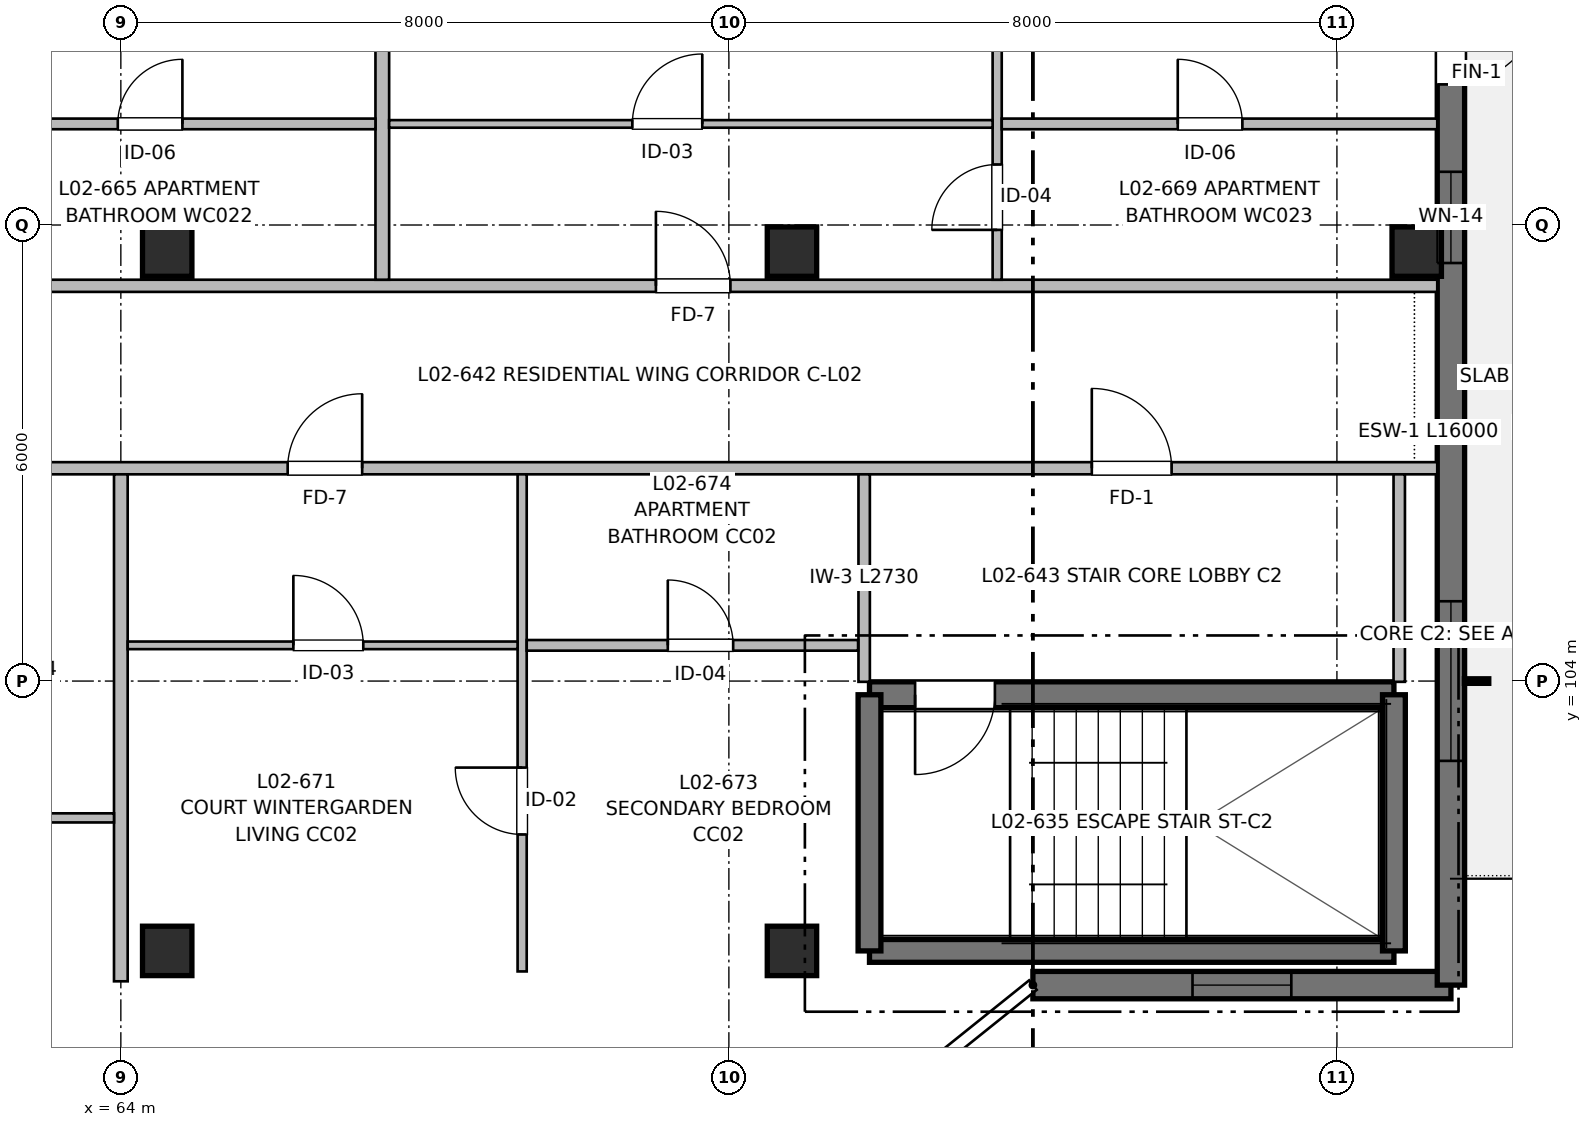
"""IFC4 building model, lengths in metres.
Left out: names, types, materials, properties, quantities, classifications, styles, units other than length and angle.
Written with IfcOpenShell. Run it as: python <this file> out.ifc"""

import sys

from ifc_helpers import new_model, si_unit, direction, frame, frame_2d, origin, origin_2d, place, context, subcontext, project, spatial, rectangle, extrude, element, fill, save


model = new_model("IFC4")
c1 = context("Model", 3, precision=1e-05, world=origin(), true_north=direction((0.0, 1.0)))
c2 = subcontext(c1, "Body", "Model", "MODEL_VIEW")
j1 = project(units=[si_unit("LENGTHUNIT", "METRE"), si_unit("PLANEANGLEUNIT", "RADIAN")], contexts=[c1])
p1 = place(None, origin())
s1 = spatial("IfcSite", under=j1, at=p1, CompositionType="ELEMENT")
p2 = place(p1, origin())
s2 = spatial("IfcBuilding", under=s1, at=p2, CompositionType="ELEMENT")
p3 = place(p2, frame((0.0, 0.0, 7.36)))
s3 = spatial("IfcBuildingStorey", under=s2, at=p3, CompositionType="ELEMENT", Elevation=7.36)
for number, where, z_axis, x_axis in (
    (1, (64.61, 100.45, 0.0), (0.0, 0.0, 1.0), (1.0, 0.0, 0.0)),
    (2, (64.61, 109.65, 0.0), (0.0, 0.0, 1.0), (1.0, 0.0, 0.0)),
    (3, (72.83, 100.45, 0.0), (0.0, 0.0, 1.0), (1.0, 0.0, 0.0)),
    (4, (72.83, 109.65, 0.0), (0.0, 0.0, 1.0), (1.0, 0.0, 0.0)),
    (5, (81.05, 109.65, 0.0), (0.0, 0.0, 1.0), (1.0, 0.0, 0.0)),
):
    element("IfcColumn", number, at=place(p3, frame(where, z_axis=z_axis, x_axis=x_axis)), inside=s3, PredefinedType="COLUMN", context=c2, shape_type="SweptSolid", body=[
        extrude(rectangle(XDim=0.65, YDim=0.65, at=origin_2d()), origin(), (0.0, 0.0, 1.0), 3.2),
    ])
p4 = place(p3, frame((73.85, 100.45, 0.0), z_axis=(0.0, 0.0, 1.0), x_axis=(1.0, 0.0, 0.0)))
e6 = element("IfcWall", 6, at=p4, inside=s3, PredefinedType="SHEAR", context=c2, shape_type="SweptSolid", body=[
    extrude(rectangle(XDim=6.9, YDim=0.3, at=frame_2d((3.45, 0.0))), origin(), (0.0, 0.0, 1.0), 3.2),
])
p5 = place(p3, frame((80.75, 103.82, 0.0), z_axis=(0.0, 0.0, 1.0), x_axis=(-1.0, 0.0, 0.0)))
e7 = element("IfcWall", 7, at=p5, inside=s3, PredefinedType="SHEAR", context=c2, shape_type="SweptSolid", body=[
    extrude(rectangle(XDim=6.9, YDim=0.34, at=frame_2d((3.45, 0.0))), origin(), (0.0, 0.0, 1.0), 3.2),
])
p6 = place(p5, frame((5.25, 0.0, 0.0)))
e8 = element("IfcOpeningElement", 8, at=p6, cuts=e7, PredefinedType="OPENING", context=c2, shape_type="SweptSolid", body=[
    extrude(rectangle(XDim=1.05, YDim=2.15, at=frame_2d((0.525, 1.075))), frame((0.0, 0.18, 0.0), z_axis=(0.0, -1.0, 0.0), x_axis=(1.0, 0.0, 0.0)), (0.0, 0.0, 1.0), 0.36),
])
for number, where, z_axis, x_axis in (
    (9, (73.85, 103.82, 0.0), (0.0, 0.0, 1.0), (0.0, -1.0, 0.0)),
    (10, (80.75, 100.45, 0.0), (0.0, 0.0, 1.0), (0.0, 1.0, 0.0)),
):
    element("IfcWall", number, at=place(p3, frame(where, z_axis=z_axis, x_axis=x_axis)), inside=s3, PredefinedType="SHEAR", context=c2, shape_type="SweptSolid", body=[
        extrude(rectangle(XDim=3.37, YDim=0.3, at=frame_2d((1.685, 0.0))), origin(), (0.0, 0.0, 1.0), 3.2),
    ])
p7 = place(p3, frame((81.5, 100.0, 0.0), z_axis=(0.0, 0.0, 1.0), x_axis=(-1.0, 0.0, 0.0)))
e11 = element("IfcWall", 11, at=p7, inside=s3, PredefinedType="SHEAR", context=c2, shape_type="SweptSolid", body=[
    extrude(rectangle(XDim=5.5, YDim=0.36, at=frame_2d((2.75, 0.0))), origin(), (0.0, 0.0, 1.0), 2.98),
])
p8 = place(p7, frame((2.1, 0.0, 0.82)))
e12 = element("IfcOpeningElement", 12, at=p8, cuts=e11, PredefinedType="OPENING", context=c2, shape_type="SweptSolid", body=[
    extrude(rectangle(XDim=1.3, YDim=1.4, at=frame_2d((0.65, 0.7))), frame((0.0, 0.19, 0.0), z_axis=(0.0, -1.0, 0.0), x_axis=(1.0, 0.0, 0.0)), (0.0, 0.0, 1.0), 0.38),
])
p9 = place(p3, frame((81.5, 116.0, 0.0), z_axis=(0.0, 0.0, 1.0), x_axis=(0.0, -1.0, 0.0)))
e13 = element("IfcWall", 13, at=p9, inside=s3, PredefinedType="SHEAR", context=c2, shape_type="SweptSolid", body=[
    extrude(rectangle(XDim=16.0, YDim=0.36, at=frame_2d((8.0, 0.0))), origin(), (0.0, 0.0, 1.0), 2.98),
])
p10 = place(p9, frame((2.95, 0.0, 0.0)))
e14 = element("IfcOpeningElement", 14, at=p10, cuts=e13, PredefinedType="OPENING", context=c2, shape_type="SweptSolid", body=[
    extrude(rectangle(XDim=1.2, YDim=2.2, at=frame_2d((0.6, 1.1))), frame((0.0, 0.19, 0.0), z_axis=(0.0, -1.0, 0.0), x_axis=(1.0, 0.0, 0.0)), (0.0, 0.0, 1.0), 0.38),
])
p11 = place(p9, frame((5.3, 0.0, 0.9)))
e15 = element("IfcOpeningElement", 15, at=p11, cuts=e13, PredefinedType="OPENING", context=c2, shape_type="SweptSolid", body=[
    extrude(rectangle(XDim=1.2, YDim=1.05, at=frame_2d((0.6, 0.525))), frame((0.0, 0.19, 0.0), z_axis=(0.0, -1.0, 0.0), x_axis=(1.0, 0.0, 0.0)), (0.0, 0.0, 1.0), 0.38),
])
p12 = place(p9, frame((10.95, 0.0, 0.67)))
e16 = element("IfcOpeningElement", 16, at=p12, cuts=e13, PredefinedType="OPENING", context=c2, shape_type="SweptSolid", body=[
    extrude(rectangle(XDim=2.1, YDim=1.55, at=frame_2d((1.05, 0.775))), frame((0.0, 0.19, 0.0), z_axis=(0.0, -1.0, 0.0), x_axis=(1.0, 0.0, 0.0)), (0.0, 0.0, 1.0), 0.38),
])
p13 = place(p3, frame((57.2, 106.8, 0.0), z_axis=(0.0, 0.0, 1.0), x_axis=(1.0, 0.0, 0.0)))
e17 = element("IfcWall", 17, at=p13, inside=s3, PredefinedType="PARTITIONING", context=c2, shape_type="SweptSolid", body=[
    extrude(rectangle(XDim=24.12, YDim=0.16, at=frame_2d((12.06, 0.0))), origin(), (0.0, 0.0, 1.0), 2.935),
])
p14 = place(p13, frame((19.575, 0.0, 0.0)))
e18 = element("IfcOpeningElement", 18, at=p14, cuts=e17, PredefinedType="OPENING", context=c2, shape_type="SweptSolid", body=[
    extrude(rectangle(XDim=1.05, YDim=2.15, at=frame_2d((0.525, 1.075))), frame((0.0, 0.09, 0.0), z_axis=(0.0, -1.0, 0.0), x_axis=(1.0, 0.0, 0.0)), (0.0, 0.0, 1.0), 0.18),
])
p15 = place(p13, frame((8.995, 0.0, 0.0)))
e19 = element("IfcOpeningElement", 19, at=p15, cuts=e17, PredefinedType="OPENING", context=c2, shape_type="SweptSolid", body=[
    extrude(rectangle(XDim=0.98, YDim=2.15, at=frame_2d((0.49, 1.075))), frame((0.0, 0.09, 0.0), z_axis=(0.0, -1.0, 0.0), x_axis=(1.0, 0.0, 0.0)), (0.0, 0.0, 1.0), 0.18),
])
p16 = place(p3, frame((39.68, 109.2, 0.0), z_axis=(0.0, 0.0, 1.0), x_axis=(1.0, 0.0, 0.0)))
e20 = element("IfcWall", 20, at=p16, inside=s3, PredefinedType="PARTITIONING", context=c2, shape_type="SweptSolid", body=[
    extrude(rectangle(XDim=41.64, YDim=0.16, at=frame_2d((20.82, 0.0))), origin(), (0.0, 0.0, 1.0), 2.935),
])
p17 = place(p16, frame((3.51, 0.0, 0.0)))
e21 = element("IfcOpeningElement", 21, at=p17, cuts=e20, PredefinedType="OPENING", context=c2, shape_type="SweptSolid", body=[
    extrude(rectangle(XDim=0.98, YDim=2.15, at=frame_2d((0.49, 1.075))), frame((0.0, 0.09, 0.0), z_axis=(0.0, -1.0, 0.0), x_axis=(1.0, 0.0, 0.0)), (0.0, 0.0, 1.0), 0.18),
])
p18 = place(p16, frame((17.455, 0.0, 0.0)))
e22 = element("IfcOpeningElement", 22, at=p18, cuts=e20, PredefinedType="OPENING", context=c2, shape_type="SweptSolid", body=[
    extrude(rectangle(XDim=0.98, YDim=2.15, at=frame_2d((0.49, 1.075))), frame((0.0, 0.09, 0.0), z_axis=(0.0, -1.0, 0.0), x_axis=(1.0, 0.0, 0.0)), (0.0, 0.0, 1.0), 0.18),
])
p19 = place(p16, frame((31.36, 0.0, 0.0)))
e23 = element("IfcOpeningElement", 23, at=p19, cuts=e20, PredefinedType="OPENING", context=c2, shape_type="SweptSolid", body=[
    extrude(rectangle(XDim=0.98, YDim=2.15, at=frame_2d((0.49, 1.075))), frame((0.0, 0.09, 0.0), z_axis=(0.0, -1.0, 0.0), x_axis=(1.0, 0.0, 0.0)), (0.0, 0.0, 1.0), 0.18),
])
p20 = place(p3, frame((64.0, 100.05, 0.0), z_axis=(0.0, 0.0, 1.0), x_axis=(0.0, 1.0, 0.0)))
e24 = element("IfcWall", 24, at=p20, inside=s3, PredefinedType="PARTITIONING", context=c2, shape_type="SweptSolid", body=[
    extrude(rectangle(XDim=6.67, YDim=0.18, at=frame_2d((3.335, 0.0))), origin(), (0.0, 0.0, 1.0), 2.935),
])
for number, where, z_axis, x_axis in (
    (25, (73.78, 103.99, 0.0), (0.0, 0.0, 1.0), (0.0, 1.0, 0.0)),
    (26, (80.82, 103.99, 0.0), (0.0, 0.0, 1.0), (0.0, 1.0, 0.0)),
):
    element("IfcWall", number, at=place(p3, frame(where, z_axis=z_axis, x_axis=x_axis)), inside=s3, PredefinedType="PARTITIONING", context=c2, shape_type="SweptSolid", body=[
        extrude(rectangle(XDim=2.73, YDim=0.15, at=frame_2d((1.365, 0.0))), origin(), (0.0, 0.0, 1.0), 2.935),
    ])
p21 = place(p3, frame((59.72, 102.2, 0.0), z_axis=(0.0, 0.0, 1.0), x_axis=(1.0, 0.0, 0.0)))
e27 = element("IfcWall", 27, at=p21, inside=s3, PredefinedType="PARTITIONING", context=c2, shape_type="SweptSolid", body=[
    extrude(rectangle(XDim=4.19, YDim=0.12, at=frame_2d((2.095, 0.0))), origin(), (0.0, 0.0, 1.0), 2.935),
])
p22 = place(p21, frame((1.655, 0.0, 0.0)))
e28 = element("IfcOpeningElement", 28, at=p22, cuts=e27, PredefinedType="OPENING", context=c2, shape_type="SweptSolid", body=[
    extrude(rectangle(XDim=0.88, YDim=2.1, at=frame_2d((0.44, 1.05))), frame((0.0, 0.07, 0.0), z_axis=(0.0, -1.0, 0.0), x_axis=(1.0, 0.0, 0.0)), (0.0, 0.0, 1.0), 0.14),
])
p23 = place(p3, frame((67.44, 109.28, 0.0), z_axis=(0.0, 0.0, 1.0), x_axis=(0.0, 1.0, 0.0)))
e29 = element("IfcWall", 29, at=p23, inside=s3, PredefinedType="PARTITIONING", context=c2, shape_type="SweptSolid", body=[
    extrude(rectangle(XDim=6.6, YDim=0.18, at=frame_2d((3.3, 0.0))), origin(), (0.0, 0.0, 1.0), 2.935),
])
p24 = place(p3, frame((61.66, 111.33, 0.0), z_axis=(0.0, 0.0, 1.0), x_axis=(1.0, 0.0, 0.0)))
e30 = element("IfcWall", 30, at=p24, inside=s3, PredefinedType="PARTITIONING", context=c2, shape_type="SweptSolid", body=[
    extrude(rectangle(XDim=5.69, YDim=0.14, at=frame_2d((2.845, 0.0))), origin(), (0.0, 0.0, 1.0), 2.935),
])
p25 = place(p24, frame((2.3, 0.0, 0.0)))
e31 = element("IfcOpeningElement", 31, at=p25, cuts=e30, PredefinedType="OPENING", context=c2, shape_type="SweptSolid", body=[
    extrude(rectangle(XDim=0.85, YDim=2.05, at=frame_2d((0.425, 1.025))), frame((0.0, 0.08, 0.0), z_axis=(0.0, -1.0, 0.0), x_axis=(1.0, 0.0, 0.0)), (0.0, 0.0, 1.0), 0.16),
])
p26 = place(p3, frame((75.53, 109.28, 0.0), z_axis=(0.0, 0.0, 1.0), x_axis=(0.0, 1.0, 0.0)))
e32 = element("IfcWall", 32, at=p26, inside=s3, PredefinedType="PARTITIONING", context=c2, shape_type="SweptSolid", body=[
    extrude(rectangle(XDim=6.6, YDim=0.12, at=frame_2d((3.3, 0.0))), origin(), (0.0, 0.0, 1.0), 2.935),
])
p27 = place(p26, frame((0.656, 0.0, 0.0)))
e33 = element("IfcOpeningElement", 33, at=p27, cuts=e32, PredefinedType="OPENING", context=c2, shape_type="SweptSolid", body=[
    extrude(rectangle(XDim=0.86, YDim=2.1, at=frame_2d((0.43, 1.05))), frame((0.0, 0.07, 0.0), z_axis=(0.0, -1.0, 0.0), x_axis=(1.0, 0.0, 0.0)), (0.0, 0.0, 1.0), 0.14),
])
p28 = place(p26, frame((4.097, 0.0, 0.0)))
e34 = element("IfcOpeningElement", 34, at=p28, cuts=e32, PredefinedType="OPENING", context=c2, shape_type="SweptSolid", body=[
    extrude(rectangle(XDim=0.9, YDim=2.1, at=frame_2d((0.45, 1.05))), frame((0.0, 0.07, 0.0), z_axis=(0.0, -1.0, 0.0), x_axis=(1.0, 0.0, 0.0)), (0.0, 0.0, 1.0), 0.14),
])
p29 = place(p3, frame((75.59, 111.33, 0.0), z_axis=(0.0, 0.0, 1.0), x_axis=(1.0, 0.0, 0.0)))
e35 = element("IfcWall", 35, at=p29, inside=s3, PredefinedType="PARTITIONING", context=c2, shape_type="SweptSolid", body=[
    extrude(rectangle(XDim=5.73, YDim=0.14, at=frame_2d((2.865, 0.0))), origin(), (0.0, 0.0, 1.0), 2.935),
])
p30 = place(p29, frame((2.316, 0.0, 0.0)))
e36 = element("IfcOpeningElement", 36, at=p30, cuts=e35, PredefinedType="OPENING", context=c2, shape_type="SweptSolid", body=[
    extrude(rectangle(XDim=0.85, YDim=2.05, at=frame_2d((0.425, 1.025))), frame((0.0, 0.08, 0.0), z_axis=(0.0, -1.0, 0.0), x_axis=(1.0, 0.0, 0.0)), (0.0, 0.0, 1.0), 0.16),
])
p31 = place(p3, frame((67.53, 111.33, 0.0), z_axis=(0.0, 0.0, 1.0), x_axis=(1.0, 0.0, 0.0)))
e37 = element("IfcWall", 37, at=p31, inside=s3, PredefinedType="PARTITIONING", context=c2, shape_type="SweptSolid", body=[
    extrude(rectangle(XDim=7.94, YDim=0.1, at=frame_2d((3.97, 0.0))), origin(), (0.0, 0.0, 1.0), 2.935),
])
p32 = place(p31, frame((3.2, 0.0, 0.0)))
e38 = element("IfcOpeningElement", 38, at=p32, cuts=e37, PredefinedType="OPENING", context=c2, shape_type="SweptSolid", body=[
    extrude(rectangle(XDim=0.92, YDim=2.1, at=frame_2d((0.46, 1.05))), frame((0.0, 0.06, 0.0), z_axis=(0.0, -1.0, 0.0), x_axis=(1.0, 0.0, 0.0)), (0.0, 0.0, 1.0), 0.12),
])
p33 = place(p3, frame((69.28, 100.18, 0.0), z_axis=(0.0, 0.0, 1.0), x_axis=(0.0, 1.0, 0.0)))
e39 = element("IfcWall", 39, at=p33, inside=s3, PredefinedType="PARTITIONING", context=c2, shape_type="SweptSolid", body=[
    extrude(rectangle(XDim=6.54, YDim=0.12, at=frame_2d((3.27, 0.0))), origin(), (0.0, 0.0, 1.0), 2.935),
])
p34 = place(p33, frame((1.802, 0.0, 0.0)))
e40 = element("IfcOpeningElement", 40, at=p34, cuts=e39, PredefinedType="OPENING", context=c2, shape_type="SweptSolid", body=[
    extrude(rectangle(XDim=0.88, YDim=2.1, at=frame_2d((0.44, 1.05))), frame((0.0, 0.07, 0.0), z_axis=(0.0, -1.0, 0.0), x_axis=(1.0, 0.0, 0.0)), (0.0, 0.0, 1.0), 0.14),
])
p35 = place(p3, frame((69.34, 104.47, 0.0), z_axis=(0.0, 0.0, 1.0), x_axis=(1.0, 0.0, 0.0)))
e41 = element("IfcWall", 41, at=p35, inside=s3, PredefinedType="PARTITIONING", context=c2, shape_type="SweptSolid", body=[
    extrude(rectangle(XDim=4.36, YDim=0.14, at=frame_2d((2.18, 0.0))), origin(), (0.0, 0.0, 1.0), 2.935),
])
p36 = place(p35, frame((1.856, 0.0, 0.0)))
e42 = element("IfcOpeningElement", 42, at=p36, cuts=e41, PredefinedType="OPENING", context=c2, shape_type="SweptSolid", body=[
    extrude(rectangle(XDim=0.86, YDim=2.1, at=frame_2d((0.43, 1.05))), frame((0.0, 0.08, 0.0), z_axis=(0.0, -1.0, 0.0), x_axis=(1.0, 0.0, 0.0)), (0.0, 0.0, 1.0), 0.16),
])
p37 = place(p3, frame((64.09, 104.47, 0.0), z_axis=(0.0, 0.0, 1.0), x_axis=(1.0, 0.0, 0.0)))
e43 = element("IfcWall", 43, at=p37, inside=s3, PredefinedType="PARTITIONING", context=c2, shape_type="SweptSolid", body=[
    extrude(rectangle(XDim=5.13, YDim=0.1, at=frame_2d((2.565, 0.0))), origin(), (0.0, 0.0, 1.0), 2.935),
])
p38 = place(p37, frame((2.18, 0.0, 0.0)))
e44 = element("IfcOpeningElement", 44, at=p38, cuts=e43, PredefinedType="OPENING", context=c2, shape_type="SweptSolid", body=[
    extrude(rectangle(XDim=0.92, YDim=2.1, at=frame_2d((0.46, 1.05))), frame((0.0, 0.06, 0.0), z_axis=(0.0, -1.0, 0.0), x_axis=(1.0, 0.0, 0.0)), (0.0, 0.0, 1.0), 0.12),
])
p39 = place(p6, origin())
e45 = element("IfcDoor", 45, at=p39, inside=s3, OperationType="SINGLE_SWING_RIGHT", PredefinedType="DOOR", context=c2, shape_type="SweptSolid", body=[
    extrude(rectangle(XDim=1.05, YDim=2.15, at=frame_2d((0.525, 1.075))), frame((0.0, 0.025, 0.0), z_axis=(0.0, -1.0, 0.0), x_axis=(1.0, 0.0, 0.0)), (0.0, 0.0, 1.0), 0.05),
])
fill(e8, e45)
p40 = place(p8, origin())
e46 = element("IfcWindow", 46, at=p40, inside=s3, PartitioningType="SINGLE_PANEL", PredefinedType="WINDOW", context=c2, shape_type="SweptSolid", body=[
    extrude(rectangle(XDim=1.3, YDim=1.4, at=frame_2d((0.65, 0.7))), frame((0.0, 0.03, 0.0), z_axis=(0.0, -1.0, 0.0), x_axis=(1.0, 0.0, 0.0)), (0.0, 0.0, 1.0), 0.06),
])
fill(e12, e46)
p41 = place(p10, origin())
e47 = element("IfcDoor", 47, at=p41, inside=s3, OperationType="SINGLE_SWING_LEFT", PredefinedType="DOOR", context=c2, shape_type="SweptSolid", body=[
    extrude(rectangle(XDim=1.2, YDim=2.2, at=frame_2d((0.6, 1.1))), frame((0.0, 0.025, 0.0), z_axis=(0.0, -1.0, 0.0), x_axis=(1.0, 0.0, 0.0)), (0.0, 0.0, 1.0), 0.05),
])
fill(e14, e47)
p42 = place(p11, origin())
e48 = element("IfcWindow", 48, at=p42, inside=s3, PartitioningType="SINGLE_PANEL", PredefinedType="WINDOW", context=c2, shape_type="SweptSolid", body=[
    extrude(rectangle(XDim=1.2, YDim=1.05, at=frame_2d((0.6, 0.525))), frame((0.0, 0.03, 0.0), z_axis=(0.0, -1.0, 0.0), x_axis=(1.0, 0.0, 0.0)), (0.0, 0.0, 1.0), 0.06),
])
fill(e15, e48)
p43 = place(p12, origin())
e49 = element("IfcWindow", 49, at=p43, inside=s3, PartitioningType="SINGLE_PANEL", PredefinedType="WINDOW", context=c2, shape_type="SweptSolid", body=[
    extrude(rectangle(XDim=2.1, YDim=1.55, at=frame_2d((1.05, 0.775))), frame((0.0, 0.03, 0.0), z_axis=(0.0, -1.0, 0.0), x_axis=(1.0, 0.0, 0.0)), (0.0, 0.0, 1.0), 0.06),
])
fill(e16, e49)
p44 = place(p14, origin())
e50 = element("IfcDoor", 50, at=p44, inside=s3, OperationType="SINGLE_SWING_LEFT", PredefinedType="DOOR", context=c2, shape_type="SweptSolid", body=[
    extrude(rectangle(XDim=1.05, YDim=2.15, at=frame_2d((0.525, 1.075))), frame((0.0, 0.025, 0.0), z_axis=(0.0, -1.0, 0.0), x_axis=(1.0, 0.0, 0.0)), (0.0, 0.0, 1.0), 0.05),
])
fill(e18, e50)
p45 = place(p25, origin())
e51 = element("IfcDoor", 51, at=p45, inside=s3, OperationType="SINGLE_SWING_RIGHT", PredefinedType="DOOR", context=c2, shape_type="SweptSolid", body=[
    extrude(rectangle(XDim=0.85, YDim=2.05, at=frame_2d((0.425, 1.025))), frame((0.0, 0.025, 0.0), z_axis=(0.0, -1.0, 0.0), x_axis=(1.0, 0.0, 0.0)), (0.0, 0.0, 1.0), 0.05),
])
fill(e31, e51)
p46 = place(p19, origin())
e52 = element("IfcDoor", 52, at=p46, inside=s3, OperationType="SINGLE_SWING_LEFT", PredefinedType="DOOR", context=c2, shape_type="SweptSolid", body=[
    extrude(rectangle(XDim=0.98, YDim=2.15, at=frame_2d((0.49, 1.075))), frame((0.0, 0.025, 0.0), z_axis=(0.0, -1.0, 0.0), x_axis=(1.0, 0.0, 0.0)), (0.0, 0.0, 1.0), 0.05),
])
fill(e23, e52)
p47 = place(p32, origin())
e53 = element("IfcDoor", 53, at=p47, inside=s3, OperationType="SINGLE_SWING_RIGHT", PredefinedType="DOOR", context=c2, shape_type="SweptSolid", body=[
    extrude(rectangle(XDim=0.92, YDim=2.1, at=frame_2d((0.46, 1.05))), frame((0.0, 0.025, 0.0), z_axis=(0.0, -1.0, 0.0), x_axis=(1.0, 0.0, 0.0)), (0.0, 0.0, 1.0), 0.05),
])
fill(e38, e53)
p48 = place(p27, origin())
e54 = element("IfcDoor", 54, at=p48, inside=s3, OperationType="SINGLE_SWING_LEFT", PredefinedType="DOOR", context=c2, shape_type="SweptSolid", body=[
    extrude(rectangle(XDim=0.86, YDim=2.1, at=frame_2d((0.43, 1.05))), frame((0.0, 0.025, 0.0), z_axis=(0.0, -1.0, 0.0), x_axis=(1.0, 0.0, 0.0)), (0.0, 0.0, 1.0), 0.05),
])
fill(e33, e54)
p49 = place(p30, origin())
e55 = element("IfcDoor", 55, at=p49, inside=s3, OperationType="SINGLE_SWING_LEFT", PredefinedType="DOOR", context=c2, shape_type="SweptSolid", body=[
    extrude(rectangle(XDim=0.85, YDim=2.05, at=frame_2d((0.425, 1.025))), frame((0.0, 0.025, 0.0), z_axis=(0.0, -1.0, 0.0), x_axis=(1.0, 0.0, 0.0)), (0.0, 0.0, 1.0), 0.05),
])
fill(e36, e55)
p50 = place(p15, origin())
e56 = element("IfcDoor", 56, at=p50, inside=s3, OperationType="SINGLE_SWING_RIGHT", PredefinedType="DOOR", context=c2, shape_type="SweptSolid", body=[
    extrude(rectangle(XDim=0.98, YDim=2.15, at=frame_2d((0.49, 1.075))), frame((0.0, 0.025, 0.0), z_axis=(0.0, -1.0, 0.0), x_axis=(1.0, 0.0, 0.0)), (0.0, 0.0, 1.0), 0.05),
])
fill(e19, e56)
p51 = place(p38, origin())
e57 = element("IfcDoor", 57, at=p51, inside=s3, OperationType="SINGLE_SWING_LEFT", PredefinedType="DOOR", context=c2, shape_type="SweptSolid", body=[
    extrude(rectangle(XDim=0.92, YDim=2.1, at=frame_2d((0.46, 1.05))), frame((0.0, 0.025, 0.0), z_axis=(0.0, -1.0, 0.0), x_axis=(1.0, 0.0, 0.0)), (0.0, 0.0, 1.0), 0.05),
])
fill(e44, e57)
p52 = place(p34, origin())
e58 = element("IfcDoor", 58, at=p52, inside=s3, OperationType="SINGLE_SWING_RIGHT", PredefinedType="DOOR", context=c2, shape_type="SweptSolid", body=[
    extrude(rectangle(XDim=0.88, YDim=2.1, at=frame_2d((0.44, 1.05))), frame((0.0, 0.025, 0.0), z_axis=(0.0, -1.0, 0.0), x_axis=(1.0, 0.0, 0.0)), (0.0, 0.0, 1.0), 0.05),
])
fill(e40, e58)
p53 = place(p36, origin())
e59 = element("IfcDoor", 59, at=p53, inside=s3, OperationType="SINGLE_SWING_LEFT", PredefinedType="DOOR", context=c2, shape_type="SweptSolid", body=[
    extrude(rectangle(XDim=0.86, YDim=2.1, at=frame_2d((0.43, 1.05))), frame((0.0, 0.025, 0.0), z_axis=(0.0, -1.0, 0.0), x_axis=(1.0, 0.0, 0.0)), (0.0, 0.0, 1.0), 0.05),
])
fill(e42, e59)
save(model, sys.argv[1])
